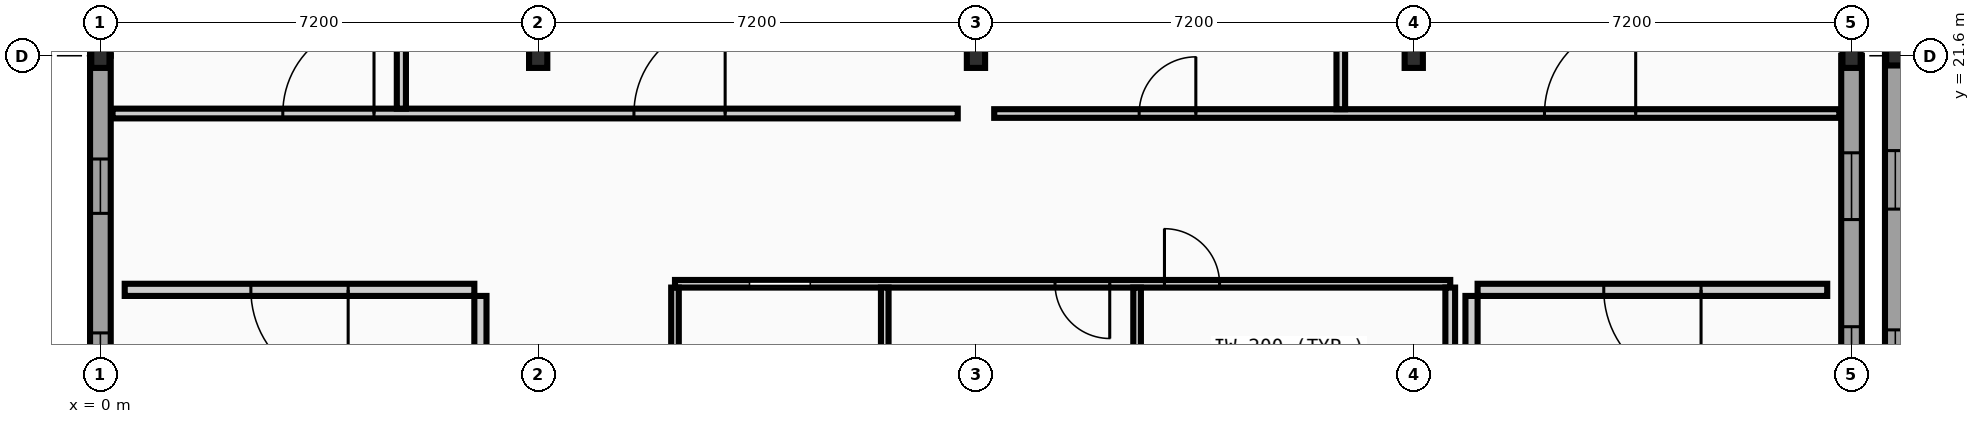
"""IFC4 building model, lengths in metres.
Left out: names, types, materials, properties, quantities, classifications, styles, units other than length and angle.
Written with IfcOpenShell. Run it as: python <this file> out.ifc"""

import sys

from ifc_helpers import new_model, si_unit, direction, frame, frame_2d, origin, origin_2d, place, context, subcontext, project, spatial, rectangle, i_section, extrude, element, fill, save


model = new_model("IFC4")
c1 = context("Model", 3, precision=1e-05, world=origin(), true_north=direction((0.0, 1.0)))
c2 = subcontext(c1, "Body", "Model", "MODEL_VIEW")
j1 = project(units=[si_unit("LENGTHUNIT", "METRE"), si_unit("PLANEANGLEUNIT", "RADIAN")], contexts=[c1])
p1 = place(None, origin())
s1 = spatial("IfcSite", under=j1, at=p1, CompositionType="ELEMENT")
p2 = place(p1, origin())
s2 = spatial("IfcBuilding", under=s1, at=p2, CompositionType="ELEMENT")
p3 = place(p2, frame((0.0, 0.0, 14.0)))
s3 = spatial("IfcBuildingStorey", under=s2, at=p3, CompositionType="ELEMENT", Elevation=14.0)
for number, where, z_axis, x_axis in (
    (1, (0.0, 21.6, 0.0), (0.0, 0.0, 1.0), (1.0, 0.0, 0.0)),
    (2, (7.2, 21.6, 0.0), (0.0, 0.0, 1.0), (1.0, 0.0, 0.0)),
    (3, (14.4, 21.6, 0.0), (0.0, 0.0, 1.0), (1.0, 0.0, 0.0)),
    (4, (21.6, 21.6, 0.0), (0.0, 0.0, 1.0), (1.0, 0.0, 0.0)),
    (5, (28.8, 21.6, 0.0), (0.0, 0.0, 1.0), (1.0, 0.0, 0.0)),
):
    element("IfcColumn", number, at=place(p3, frame(where, z_axis=z_axis, x_axis=x_axis)), inside=s3, PredefinedType="COLUMN", context=c2, shape_type="SweptSolid", body=[
        extrude(i_section(OverallWidth=0.3, OverallDepth=0.4, WebThickness=0.013, FlangeThickness=0.024, FilletRadius=0.027, at=origin_2d()), origin(), (0.0, 0.0, 1.0), 4.4),
    ])
p4 = place(p3, frame((29.52, 21.6, 0.0), z_axis=(0.0, 0.0, 1.0), x_axis=(1.0, 0.0, 0.0)))
e6 = element("IfcColumn", 6, at=p4, inside=s3, PredefinedType="COLUMN", context=c2, shape_type="SweptSolid", body=[
    extrude(i_section(OverallWidth=0.3, OverallDepth=0.32, WebThickness=0.011, FlangeThickness=0.021, FilletRadius=0.027, at=origin_2d()), origin(), (0.0, 0.0, 1.0), 4.4),
])
p5 = place(p3, frame((0.0, 21.6, 0.0), z_axis=(0.0, 0.0, 1.0), x_axis=(0.0, -1.0, 0.0)))
e7 = element("IfcWall", 7, at=p5, inside=s3, PredefinedType="STANDARD", context=c2, shape_type="SweptSolid", body=[
    extrude(rectangle(XDim=7.15, YDim=0.34, at=frame_2d((3.575, 0.0))), origin(), (0.0, 0.0, 1.0), 4.2),
])
p6 = place(p5, frame((1.698, 0.0, 0.95)))
e8 = element("IfcOpeningElement", 8, at=p6, cuts=e7, PredefinedType="OPENING", context=c2, shape_type="SweptSolid", body=[
    extrude(rectangle(XDim=0.894, YDim=1.368, at=frame_2d((0.447, 0.684))), frame((0.0, 0.18, 0.0), z_axis=(0.0, -1.0, 0.0), x_axis=(1.0, 0.0, 0.0)), (0.0, 0.0, 1.0), 0.36),
])
p7 = place(p5, frame((4.558, 0.0, 0.95)))
e9 = element("IfcOpeningElement", 9, at=p7, cuts=e7, PredefinedType="OPENING", context=c2, shape_type="SweptSolid", body=[
    extrude(rectangle(XDim=0.894, YDim=1.368, at=frame_2d((0.447, 0.684))), frame((0.0, 0.18, 0.0), z_axis=(0.0, -1.0, 0.0), x_axis=(1.0, 0.0, 0.0)), (0.0, 0.0, 1.0), 0.36),
])
p8 = place(p3, frame((0.0, 28.8, 0.0), z_axis=(0.0, 0.0, 1.0), x_axis=(0.0, -1.0, 0.0)))
e10 = element("IfcWall", 10, at=p8, inside=s3, PredefinedType="STANDARD", context=c2, shape_type="SweptSolid", body=[
    extrude(rectangle(XDim=7.2, YDim=0.34, at=frame_2d((3.6, 0.0))), origin(), (0.0, 0.0, 1.0), 3.885),
])
p9 = place(p8, frame((1.696, 0.0, 0.95)))
e11 = element("IfcOpeningElement", 11, at=p9, cuts=e10, PredefinedType="OPENING", context=c2, shape_type="SweptSolid", body=[
    extrude(rectangle(XDim=0.928, YDim=1.368, at=frame_2d((0.464, 0.684))), frame((0.0, 0.18, 0.0), z_axis=(0.0, -1.0, 0.0), x_axis=(1.0, 0.0, 0.0)), (0.0, 0.0, 1.0), 0.36),
])
p10 = place(p8, frame((4.576, 0.0, 0.95)))
e12 = element("IfcOpeningElement", 12, at=p10, cuts=e10, PredefinedType="OPENING", context=c2, shape_type="SweptSolid", body=[
    extrude(rectangle(XDim=0.928, YDim=1.368, at=frame_2d((0.464, 0.684))), frame((0.0, 0.18, 0.0), z_axis=(0.0, -1.0, 0.0), x_axis=(1.0, 0.0, 0.0)), (0.0, 0.0, 1.0), 0.36),
])
p11 = place(p3, frame((28.8, 14.45, 0.0), z_axis=(0.0, 0.0, 1.0), x_axis=(0.0, 1.0, 0.0)))
e13 = element("IfcWall", 13, at=p11, inside=s3, PredefinedType="STANDARD", context=c2, shape_type="SweptSolid", body=[
    extrude(rectangle(XDim=7.15, YDim=0.34, at=frame_2d((3.575, 0.0))), origin(), (0.0, 0.0, 1.0), 4.2),
])
p12 = place(p11, frame((1.596, 0.0, 0.95)))
e14 = element("IfcOpeningElement", 14, at=p12, cuts=e13, PredefinedType="OPENING", context=c2, shape_type="SweptSolid", body=[
    extrude(rectangle(XDim=1.098, YDim=1.368, at=frame_2d((0.549, 0.684))), frame((0.0, 0.18, 0.0), z_axis=(0.0, -1.0, 0.0), x_axis=(1.0, 0.0, 0.0)), (0.0, 0.0, 1.0), 0.36),
])
p13 = place(p11, frame((4.456, 0.0, 0.95)))
e15 = element("IfcOpeningElement", 15, at=p13, cuts=e13, PredefinedType="OPENING", context=c2, shape_type="SweptSolid", body=[
    extrude(rectangle(XDim=1.098, YDim=1.368, at=frame_2d((0.549, 0.684))), frame((0.0, 0.18, 0.0), z_axis=(0.0, -1.0, 0.0), x_axis=(1.0, 0.0, 0.0)), (0.0, 0.0, 1.0), 0.36),
])
p14 = place(p3, frame((29.52, 21.77, 0.0), z_axis=(0.0, 0.0, 1.0), x_axis=(0.0, -1.0, 0.0)))
e16 = element("IfcWall", 16, at=p14, inside=s3, PredefinedType="STANDARD", context=c2, shape_type="SweptSolid", body=[
    extrude(rectangle(XDim=7.37, YDim=0.34, at=frame_2d((3.685, 0.0))), origin(), (0.0, 0.0, 1.0), 3.895),
])
p15 = place(p14, frame((1.73, 0.0, 0.95)))
e17 = element("IfcOpeningElement", 17, at=p15, cuts=e16, PredefinedType="OPENING", context=c2, shape_type="SweptSolid", body=[
    extrude(rectangle(XDim=0.962, YDim=1.404, at=frame_2d((0.481, 0.702))), frame((0.0, 0.18, 0.0), z_axis=(0.0, -1.0, 0.0), x_axis=(1.0, 0.0, 0.0)), (0.0, 0.0, 1.0), 0.36),
])
p16 = place(p14, frame((4.678, 0.0, 0.95)))
e18 = element("IfcOpeningElement", 18, at=p16, cuts=e16, PredefinedType="OPENING", context=c2, shape_type="SweptSolid", body=[
    extrude(rectangle(XDim=0.962, YDim=1.404, at=frame_2d((0.481, 0.702))), frame((0.0, 0.18, 0.0), z_axis=(0.0, -1.0, 0.0), x_axis=(1.0, 0.0, 0.0)), (0.0, 0.0, 1.0), 0.36),
])
p17 = place(p3, frame((0.4, 17.75, 0.0), z_axis=(0.0, 0.0, 1.0), x_axis=(1.0, 0.0, 0.0)))
e19 = element("IfcWall", 19, at=p17, inside=s3, PredefinedType="PARTITIONING", context=c2, shape_type="SweptSolid", body=[
    extrude(rectangle(XDim=5.75, YDim=0.2, at=frame_2d((2.875, 0.0))), origin(), (0.0, 0.0, 1.0), 4.2),
])
p18 = place(p17, frame((2.075, 0.0, 0.0)))
e20 = element("IfcOpeningElement", 20, at=p18, cuts=e19, PredefinedType="OPENING", context=c2, shape_type="SweptSolid", body=[
    extrude(rectangle(XDim=1.6, YDim=2.2, at=frame_2d((0.8, 1.1))), frame((0.0, 0.11, 0.0), z_axis=(0.0, -1.0, 0.0), x_axis=(1.0, 0.0, 0.0)), (0.0, 0.0, 1.0), 0.22),
])
p19 = place(p3, frame((6.25, 14.45, 0.0), z_axis=(0.0, 0.0, 1.0), x_axis=(0.0, 1.0, 0.0)))
e21 = element("IfcWall", 21, at=p19, inside=s3, PredefinedType="PARTITIONING", context=c2, shape_type="SweptSolid", body=[
    extrude(rectangle(XDim=3.2, YDim=0.2, at=frame_2d((1.6, 0.0))), origin(), (0.0, 0.0, 1.0), 4.2),
])
p20 = place(p3, frame((22.65, 17.75, 0.0), z_axis=(0.0, 0.0, 1.0), x_axis=(1.0, 0.0, 0.0)))
e22 = element("IfcWall", 22, at=p20, inside=s3, PredefinedType="PARTITIONING", context=c2, shape_type="SweptSolid", body=[
    extrude(rectangle(XDim=5.75, YDim=0.2, at=frame_2d((2.875, 0.0))), origin(), (0.0, 0.0, 1.0), 4.2),
])
p21 = place(p20, frame((2.075, 0.0, 0.0)))
e23 = element("IfcOpeningElement", 23, at=p21, cuts=e22, PredefinedType="OPENING", context=c2, shape_type="SweptSolid", body=[
    extrude(rectangle(XDim=1.6, YDim=2.2, at=frame_2d((0.8, 1.1))), frame((0.0, 0.11, 0.0), z_axis=(0.0, -1.0, 0.0), x_axis=(1.0, 0.0, 0.0)), (0.0, 0.0, 1.0), 0.22),
])
p22 = place(p3, frame((22.55, 14.45, 0.0), z_axis=(0.0, 0.0, 1.0), x_axis=(0.0, 1.0, 0.0)))
e24 = element("IfcWall", 24, at=p22, inside=s3, PredefinedType="PARTITIONING", context=c2, shape_type="SweptSolid", body=[
    extrude(rectangle(XDim=3.2, YDim=0.2, at=frame_2d((1.6, 0.0))), origin(), (0.0, 0.0, 1.0), 4.2),
])
p23 = place(p3, frame((9.45, 17.85, 0.0), z_axis=(0.0, 0.0, 1.0), x_axis=(1.0, 0.0, 0.0)))
e25 = element("IfcWall", 25, at=p23, inside=s3, PredefinedType="PARTITIONING", context=c2, shape_type="SweptSolid", body=[
    extrude(rectangle(XDim=12.75, YDim=0.125, at=frame_2d((6.375, 0.0))), origin(), (0.0, 0.0, 1.0), 4.2),
])
p24 = place(p23, frame((1.225, 0.0, 0.0)))
e26 = element("IfcOpeningElement", 26, at=p24, cuts=e25, PredefinedType="OPENING", context=c2, shape_type="SweptSolid", body=[
    extrude(rectangle(XDim=1.0, YDim=2.1, at=frame_2d((0.5, 1.05))), frame((0.0, 0.073, 0.0), z_axis=(0.0, -1.0, 0.0), x_axis=(1.0, 0.0, 0.0)), (0.0, 0.0, 1.0), 0.145),
])
p25 = place(p23, frame((6.25, 0.0, 0.0)))
e27 = element("IfcOpeningElement", 27, at=p25, cuts=e25, PredefinedType="OPENING", context=c2, shape_type="SweptSolid", body=[
    extrude(rectangle(XDim=0.9, YDim=2.1, at=frame_2d((0.45, 1.05))), frame((0.0, 0.073, 0.0), z_axis=(0.0, -1.0, 0.0), x_axis=(1.0, 0.0, 0.0)), (0.0, 0.0, 1.0), 0.145),
])
p26 = place(p23, frame((8.05, 0.0, 0.0)))
e28 = element("IfcOpeningElement", 28, at=p26, cuts=e25, PredefinedType="OPENING", context=c2, shape_type="SweptSolid", body=[
    extrude(rectangle(XDim=0.906, YDim=2.04, at=frame_2d((0.453, 1.02))), frame((0.0, 0.073, 0.0), z_axis=(0.0, -1.0, 0.0), x_axis=(1.0, 0.0, 0.0)), (0.0, 0.0, 1.0), 0.145),
])
p27 = place(p3, frame((0.2, 20.65, 0.0), z_axis=(0.0, 0.0, 1.0), x_axis=(1.0, 0.0, 0.0)))
e29 = element("IfcWall", 29, at=p27, inside=s3, PredefinedType="PARTITIONING", context=c2, shape_type="SweptSolid", body=[
    extrude(rectangle(XDim=13.9, YDim=0.16, at=frame_2d((6.95, 0.0))), origin(), (0.0, 0.0, 1.0), 4.2),
])
p28 = place(p27, frame((2.8, 0.0, 0.0)))
e30 = element("IfcOpeningElement", 30, at=p28, cuts=e29, PredefinedType="OPENING", context=c2, shape_type="SweptSolid", body=[
    extrude(rectangle(XDim=1.5, YDim=2.2, at=frame_2d((0.75, 1.1))), frame((0.0, 0.09, 0.0), z_axis=(0.0, -1.0, 0.0), x_axis=(1.0, 0.0, 0.0)), (0.0, 0.0, 1.0), 0.18),
])
p29 = place(p27, frame((8.575, 0.0, 0.0)))
e31 = element("IfcOpeningElement", 31, at=p29, cuts=e29, PredefinedType="OPENING", context=c2, shape_type="SweptSolid", body=[
    extrude(rectangle(XDim=1.5, YDim=2.2, at=frame_2d((0.75, 1.1))), frame((0.0, 0.09, 0.0), z_axis=(0.0, -1.0, 0.0), x_axis=(1.0, 0.0, 0.0)), (0.0, 0.0, 1.0), 0.18),
])
p30 = place(p3, frame((14.7, 20.65, 0.0), z_axis=(0.0, 0.0, 1.0), x_axis=(1.0, 0.0, 0.0)))
e32 = element("IfcWall", 32, at=p30, inside=s3, PredefinedType="PARTITIONING", context=c2, shape_type="SweptSolid", body=[
    extrude(rectangle(XDim=13.9, YDim=0.142, at=frame_2d((6.95, 0.0))), origin(), (0.0, 0.0, 1.0), 4.2),
])
p31 = place(p30, frame((2.384, 0.0, 0.0)))
e33 = element("IfcOpeningElement", 33, at=p31, cuts=e32, PredefinedType="OPENING", context=c2, shape_type="SweptSolid", body=[
    extrude(rectangle(XDim=0.932, YDim=2.04, at=frame_2d((0.466, 1.02))), frame((0.0, 0.081, 0.0), z_axis=(0.0, -1.0, 0.0), x_axis=(1.0, 0.0, 0.0)), (0.0, 0.0, 1.0), 0.162),
])
p32 = place(p30, frame((9.05, 0.0, 0.0)))
e34 = element("IfcOpeningElement", 34, at=p32, cuts=e32, PredefinedType="OPENING", context=c2, shape_type="SweptSolid", body=[
    extrude(rectangle(XDim=1.5, YDim=2.2, at=frame_2d((0.75, 1.1))), frame((0.0, 0.081, 0.0), z_axis=(0.0, -1.0, 0.0), x_axis=(1.0, 0.0, 0.0)), (0.0, 0.0, 1.0), 0.162),
])
p33 = place(p3, frame((4.95, 20.73, 0.0), z_axis=(0.0, 0.0, 1.0), x_axis=(0.0, 1.0, 0.0)))
e35 = element("IfcWall", 35, at=p33, inside=s3, PredefinedType="PARTITIONING", context=c2, shape_type="SweptSolid", body=[
    extrude(rectangle(XDim=29.47, YDim=0.15, at=frame_2d((14.735, 0.0))), origin(), (0.0, 0.0, 1.0), 3.945),
])
p34 = place(p3, frame((9.45, 3.36, 0.0), z_axis=(0.0, 0.0, 1.0), x_axis=(0.0, 1.0, 0.0)))
e36 = element("IfcWall", 36, at=p34, inside=s3, PredefinedType="PARTITIONING", context=c2, shape_type="SweptSolid", body=[
    extrude(rectangle(XDim=14.427, YDim=0.125, at=frame_2d((7.214, 0.0))), origin(), (0.0, 0.0, 1.0), 3.945),
])
for number, where, z_axis, x_axis in (
    (37, (12.9, 0.2, 0.0), (0.0, 0.0, 1.0), (0.0, 1.0, 0.0)),
    (38, (17.05, 0.2, 0.0), (0.0, 0.0, 1.0), (0.0, 1.0, 0.0)),
):
    element("IfcWall", number, at=place(p3, frame(where, z_axis=z_axis, x_axis=x_axis)), inside=s3, PredefinedType="PARTITIONING", context=c2, shape_type="SweptSolid", body=[
        extrude(rectangle(XDim=17.588, YDim=0.125, at=frame_2d((8.794, 0.0))), origin(), (0.0, 0.0, 1.0), 4.2),
    ])
p35 = place(p3, frame((20.4, 20.721, 0.0), z_axis=(0.0, 0.0, 1.0), x_axis=(0.0, 1.0, 0.0)))
e39 = element("IfcWall", 39, at=p35, inside=s3, PredefinedType="PARTITIONING", context=c2, shape_type="SweptSolid", body=[
    extrude(rectangle(XDim=29.408, YDim=0.142, at=frame_2d((14.704, 0.0))), origin(), (0.0, 0.0, 1.0), 4.2),
])
p36 = place(p3, frame((22.2, 14.65, 0.0), z_axis=(0.0, 0.0, 1.0), x_axis=(0.0, 1.0, 0.0)))
e40 = element("IfcWall", 40, at=p36, inside=s3, PredefinedType="PARTITIONING", context=c2, shape_type="SweptSolid", body=[
    extrude(rectangle(XDim=3.138, YDim=0.16, at=frame_2d((1.569, 0.0))), origin(), (0.0, 0.0, 1.0), 4.2),
])
p37 = place(p6, origin())
e41 = element("IfcWindow", 41, at=p37, inside=s3, PartitioningType="SINGLE_PANEL", PredefinedType="WINDOW", context=c2, shape_type="SweptSolid", body=[
    extrude(rectangle(XDim=0.894, YDim=1.368, at=frame_2d((0.447, 0.684))), frame((0.0, 0.03, 0.0), z_axis=(0.0, -1.0, 0.0), x_axis=(1.0, 0.0, 0.0)), (0.0, 0.0, 1.0), 0.06),
])
fill(e8, e41)
p38 = place(p7, origin())
e42 = element("IfcWindow", 42, at=p38, inside=s3, PartitioningType="SINGLE_PANEL", PredefinedType="WINDOW", context=c2, shape_type="SweptSolid", body=[
    extrude(rectangle(XDim=0.894, YDim=1.368, at=frame_2d((0.447, 0.684))), frame((0.0, 0.03, 0.0), z_axis=(0.0, -1.0, 0.0), x_axis=(1.0, 0.0, 0.0)), (0.0, 0.0, 1.0), 0.06),
])
fill(e9, e42)
p39 = place(p12, origin())
e43 = element("IfcWindow", 43, at=p39, inside=s3, PartitioningType="SINGLE_PANEL", PredefinedType="WINDOW", context=c2, shape_type="SweptSolid", body=[
    extrude(rectangle(XDim=1.098, YDim=1.368, at=frame_2d((0.549, 0.684))), frame((0.0, 0.03, 0.0), z_axis=(0.0, -1.0, 0.0), x_axis=(1.0, 0.0, 0.0)), (0.0, 0.0, 1.0), 0.06),
])
fill(e14, e43)
p40 = place(p13, origin())
e44 = element("IfcWindow", 44, at=p40, inside=s3, PartitioningType="SINGLE_PANEL", PredefinedType="WINDOW", context=c2, shape_type="SweptSolid", body=[
    extrude(rectangle(XDim=1.098, YDim=1.368, at=frame_2d((0.549, 0.684))), frame((0.0, 0.03, 0.0), z_axis=(0.0, -1.0, 0.0), x_axis=(1.0, 0.0, 0.0)), (0.0, 0.0, 1.0), 0.06),
])
fill(e15, e44)
p41 = place(p15, origin())
e45 = element("IfcWindow", 45, at=p41, inside=s3, PartitioningType="SINGLE_PANEL", PredefinedType="WINDOW", context=c2, shape_type="SweptSolid", body=[
    extrude(rectangle(XDim=0.962, YDim=1.404, at=frame_2d((0.481, 0.702))), frame((0.0, 0.03, 0.0), z_axis=(0.0, -1.0, 0.0), x_axis=(1.0, 0.0, 0.0)), (0.0, 0.0, 1.0), 0.06),
])
fill(e17, e45)
p42 = place(p16, origin())
e46 = element("IfcWindow", 46, at=p42, inside=s3, PartitioningType="SINGLE_PANEL", PredefinedType="WINDOW", context=c2, shape_type="SweptSolid", body=[
    extrude(rectangle(XDim=0.962, YDim=1.404, at=frame_2d((0.481, 0.702))), frame((0.0, 0.03, 0.0), z_axis=(0.0, -1.0, 0.0), x_axis=(1.0, 0.0, 0.0)), (0.0, 0.0, 1.0), 0.06),
])
fill(e18, e46)
p43 = place(p18, origin())
e47 = element("IfcDoor", 47, at=p43, inside=s3, OperationType="DOUBLE_DOOR_SINGLE_SWING", PredefinedType="DOOR", context=c2, shape_type="SweptSolid", body=[
    extrude(rectangle(XDim=1.6, YDim=2.2, at=frame_2d((0.8, 1.1))), frame((0.0, 0.025, 0.0), z_axis=(0.0, -1.0, 0.0), x_axis=(1.0, 0.0, 0.0)), (0.0, 0.0, 1.0), 0.05),
])
fill(e20, e47)
p44 = place(p21, origin())
e48 = element("IfcDoor", 48, at=p44, inside=s3, OperationType="DOUBLE_DOOR_SINGLE_SWING", PredefinedType="DOOR", context=c2, shape_type="SweptSolid", body=[
    extrude(rectangle(XDim=1.6, YDim=2.2, at=frame_2d((0.8, 1.1))), frame((0.0, 0.025, 0.0), z_axis=(0.0, -1.0, 0.0), x_axis=(1.0, 0.0, 0.0)), (0.0, 0.0, 1.0), 0.05),
])
fill(e23, e48)
p45 = place(p24, origin())
e49 = element("IfcDoor", 49, at=p45, inside=s3, OperationType="SLIDING_TO_LEFT", PredefinedType="DOOR", context=c2, shape_type="SweptSolid", body=[
    extrude(rectangle(XDim=1.0, YDim=2.1, at=frame_2d((0.5, 1.05))), frame((0.0, 0.025, 0.0), z_axis=(0.0, -1.0, 0.0), x_axis=(1.0, 0.0, 0.0)), (0.0, 0.0, 1.0), 0.05),
])
fill(e26, e49)
p46 = place(p25, origin())
e50 = element("IfcDoor", 50, at=p46, inside=s3, OperationType="SINGLE_SWING_RIGHT", PredefinedType="DOOR", context=c2, shape_type="SweptSolid", body=[
    extrude(rectangle(XDim=0.9, YDim=2.1, at=frame_2d((0.45, 1.05))), frame((0.0, 0.025, 0.0), z_axis=(0.0, -1.0, 0.0), x_axis=(1.0, 0.0, 0.0)), (0.0, 0.0, 1.0), 0.05),
])
fill(e27, e50)
p47 = place(p26, origin())
e51 = element("IfcDoor", 51, at=p47, inside=s3, OperationType="SINGLE_SWING_LEFT", PredefinedType="DOOR", context=c2, shape_type="SweptSolid", body=[
    extrude(rectangle(XDim=0.906, YDim=2.04, at=frame_2d((0.453, 1.02))), frame((0.0, 0.025, 0.0), z_axis=(0.0, -1.0, 0.0), x_axis=(1.0, 0.0, 0.0)), (0.0, 0.0, 1.0), 0.05),
])
fill(e28, e51)
p48 = place(p28, frame((1.5, 0.0, 0.0), z_axis=(0.0, 0.0, 1.0), x_axis=(-1.0, 0.0, 0.0)))
e52 = element("IfcDoor", 52, at=p48, inside=s3, OperationType="DOUBLE_DOOR_SINGLE_SWING", PredefinedType="DOOR", context=c2, shape_type="SweptSolid", body=[
    extrude(rectangle(XDim=1.5, YDim=2.2, at=frame_2d((0.75, 1.1))), frame((0.0, 0.025, 0.0), z_axis=(0.0, -1.0, 0.0), x_axis=(1.0, 0.0, 0.0)), (0.0, 0.0, 1.0), 0.05),
])
fill(e30, e52)
p49 = place(p31, frame((0.932, 0.0, 0.0), z_axis=(0.0, 0.0, 1.0), x_axis=(-1.0, 0.0, 0.0)))
e53 = element("IfcDoor", 53, at=p49, inside=s3, OperationType="SINGLE_SWING_RIGHT", PredefinedType="DOOR", context=c2, shape_type="SweptSolid", body=[
    extrude(rectangle(XDim=0.932, YDim=2.04, at=frame_2d((0.466, 1.02))), frame((0.0, 0.025, 0.0), z_axis=(0.0, -1.0, 0.0), x_axis=(1.0, 0.0, 0.0)), (0.0, 0.0, 1.0), 0.05),
])
fill(e33, e53)
p50 = place(p32, frame((1.5, 0.0, 0.0), z_axis=(0.0, 0.0, 1.0), x_axis=(-1.0, 0.0, 0.0)))
e54 = element("IfcDoor", 54, at=p50, inside=s3, OperationType="DOUBLE_DOOR_SINGLE_SWING", PredefinedType="DOOR", context=c2, shape_type="SweptSolid", body=[
    extrude(rectangle(XDim=1.5, YDim=2.2, at=frame_2d((0.75, 1.1))), frame((0.0, 0.025, 0.0), z_axis=(0.0, -1.0, 0.0), x_axis=(1.0, 0.0, 0.0)), (0.0, 0.0, 1.0), 0.05),
])
fill(e34, e54)
p51 = place(p29, frame((1.5, 0.0, 0.0), z_axis=(0.0, 0.0, 1.0), x_axis=(-1.0, 0.0, 0.0)))
e55 = element("IfcDoor", 55, at=p51, inside=s3, OperationType="DOUBLE_DOOR_SINGLE_SWING", PredefinedType="DOOR", context=c2, shape_type="SweptSolid", body=[
    extrude(rectangle(XDim=1.5, YDim=2.2, at=frame_2d((0.75, 1.1))), frame((0.0, 0.025, 0.0), z_axis=(0.0, -1.0, 0.0), x_axis=(1.0, 0.0, 0.0)), (0.0, 0.0, 1.0), 0.05),
])
fill(e31, e55)
save(model, sys.argv[1])
